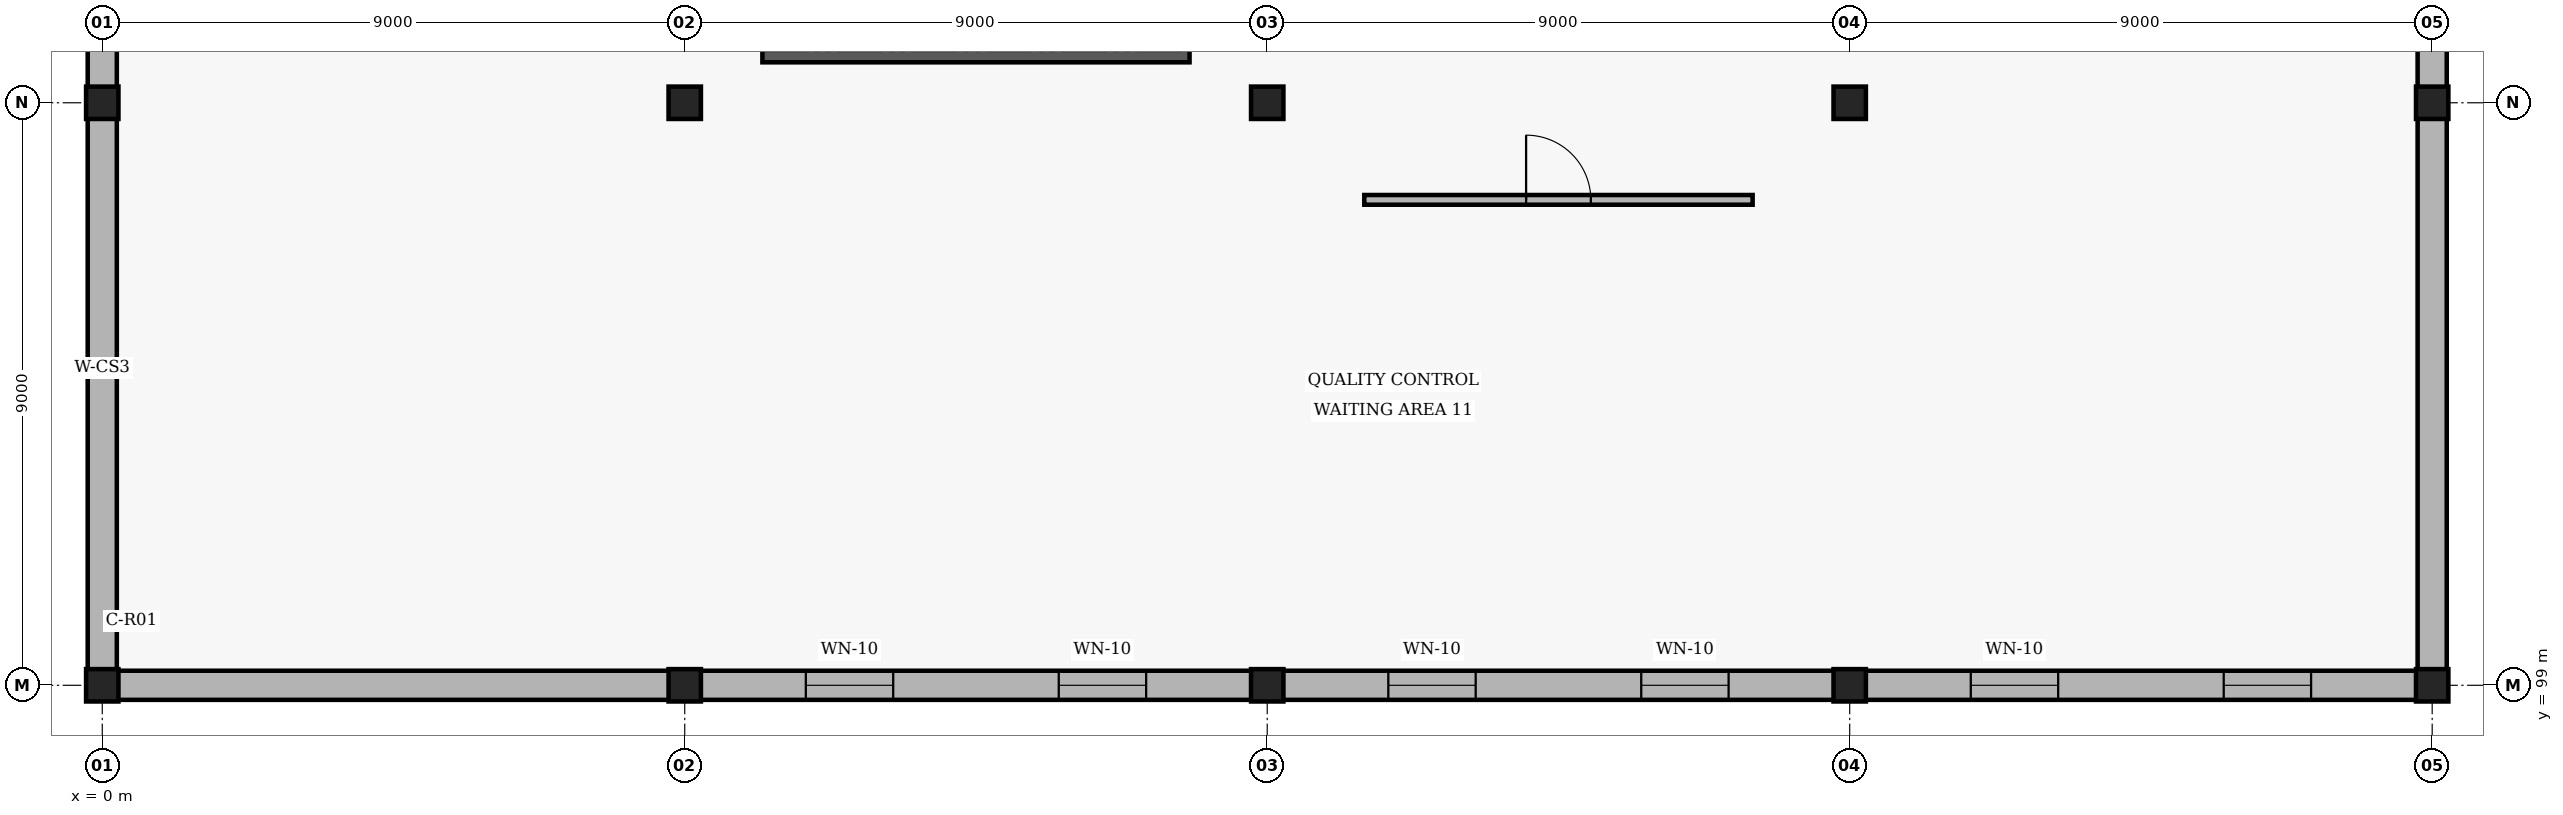
"""IFC4 building model, lengths in metres.
Left out: names, types, materials, properties, quantities, classifications, styles, units other than length and angle.
Written with IfcOpenShell. Run it as: python <this file> out.ifc"""

import sys

from ifc_helpers import new_model, si_unit, direction, frame, frame_2d, origin, origin_2d, place, context, subcontext, project, spatial, rectangle, extrude, element, fill, save


model = new_model("IFC4")
c1 = context("Model", 3, precision=1e-05, world=origin(), true_north=direction((0.0, 1.0)))
c2 = subcontext(c1, "Body", "Model", "MODEL_VIEW")
j1 = project(units=[si_unit("LENGTHUNIT", "METRE"), si_unit("PLANEANGLEUNIT", "RADIAN")], contexts=[c1])
p1 = place(None, origin())
s1 = spatial("IfcSite", under=j1, at=p1, CompositionType="ELEMENT")
p2 = place(p1, origin())
s2 = spatial("IfcBuilding", under=s1, at=p2, CompositionType="ELEMENT")
p3 = place(p2, frame((0.0, 0.0, 9.6)))
s3 = spatial("IfcBuildingStorey", under=s2, at=p3, CompositionType="ELEMENT", Elevation=9.6)
for number, where, z_axis, x_axis in (
    (1, (0.0, 99.0, 0.0), (0.0, 0.0, 1.0), (1.0, 0.0, 0.0)),
    (2, (0.0, 108.0, 0.0), (0.0, 0.0, 1.0), (1.0, 0.0, 0.0)),
    (3, (9.0, 99.0, 0.0), (0.0, 0.0, 1.0), (1.0, 0.0, 0.0)),
    (4, (9.0, 108.0, 0.0), (0.0, 0.0, 1.0), (1.0, 0.0, 0.0)),
    (5, (18.0, 99.0, 0.0), (0.0, 0.0, 1.0), (1.0, 0.0, 0.0)),
    (6, (18.0, 108.0, 0.0), (0.0, 0.0, 1.0), (1.0, 0.0, 0.0)),
    (7, (27.0, 99.0, 0.0), (0.0, 0.0, 1.0), (1.0, 0.0, 0.0)),
    (8, (27.0, 108.0, 0.0), (0.0, 0.0, 1.0), (1.0, 0.0, 0.0)),
    (9, (36.0, 99.0, 0.0), (0.0, 0.0, 1.0), (1.0, 0.0, 0.0)),
    (10, (36.0, 108.0, 0.0), (0.0, 0.0, 1.0), (1.0, 0.0, 0.0)),
):
    element("IfcColumn", number, at=place(p3, frame(where, z_axis=z_axis, x_axis=x_axis)), inside=s3, PredefinedType="COLUMN", context=c2, shape_type="SweptSolid", body=[
        extrude(rectangle(XDim=0.5, YDim=0.5, at=origin_2d()), origin(), (0.0, 0.0, 1.0), 3.9),
    ])
p4 = place(p3, frame((0.0, 99.06, 0.0), z_axis=(0.0, 0.0, 1.0), x_axis=(0.0, 1.0, 0.0)))
e11 = element("IfcWall", 11, at=p4, inside=s3, PredefinedType="SOLIDWALL", context=c2, shape_type="SweptSolid", body=[
    extrude(rectangle(XDim=8.88, YDim=0.45, at=frame_2d((4.44, 0.0))), origin(), (0.0, 0.0, 1.0), 3.15),
])
p5 = place(p3, frame((0.0, 108.06, 0.0), z_axis=(0.0, 0.0, 1.0), x_axis=(0.0, 1.0, 0.0)))
e12 = element("IfcWall", 12, at=p5, inside=s3, PredefinedType="SOLIDWALL", context=c2, shape_type="SweptSolid", body=[
    extrude(rectangle(XDim=8.88, YDim=0.45, at=frame_2d((4.44, 0.0))), origin(), (0.0, 0.0, 1.0), 3.15),
])
p6 = place(p5, frame((1.936, 0.0, 0.9)))
e13 = element("IfcOpeningElement", 13, at=p6, cuts=e12, PredefinedType="OPENING", context=c2, shape_type="SweptSolid", body=[
    extrude(rectangle(XDim=1.1, YDim=1.65, at=frame_2d((0.55, 0.825))), frame((0.0, 0.235, 0.0), z_axis=(0.0, -1.0, 0.0), x_axis=(1.0, 0.0, 0.0)), (0.0, 0.0, 1.0), 0.47),
])
p7 = place(p5, frame((5.844, 0.0, 0.9)))
e14 = element("IfcOpeningElement", 14, at=p7, cuts=e12, PredefinedType="OPENING", context=c2, shape_type="SweptSolid", body=[
    extrude(rectangle(XDim=1.1, YDim=1.65, at=frame_2d((0.55, 0.825))), frame((0.0, 0.235, 0.0), z_axis=(0.0, -1.0, 0.0), x_axis=(1.0, 0.0, 0.0)), (0.0, 0.0, 1.0), 0.47),
])
p8 = place(p3, frame((0.06, 99.0, 0.0), z_axis=(0.0, 0.0, 1.0), x_axis=(1.0, 0.0, 0.0)))
e15 = element("IfcWall", 15, at=p8, inside=s3, PredefinedType="SOLIDWALL", context=c2, shape_type="SweptSolid", body=[
    extrude(rectangle(XDim=8.88, YDim=0.45, at=frame_2d((4.44, 0.0))), origin(), (0.0, 0.0, 1.0), 3.15),
])
p9 = place(p3, frame((9.06, 99.0, 0.0), z_axis=(0.0, 0.0, 1.0), x_axis=(1.0, 0.0, 0.0)))
e16 = element("IfcWall", 16, at=p9, inside=s3, PredefinedType="SOLIDWALL", context=c2, shape_type="SweptSolid", body=[
    extrude(rectangle(XDim=8.88, YDim=0.45, at=frame_2d((4.44, 0.0))), origin(), (0.0, 0.0, 1.0), 3.15),
])
p10 = place(p9, frame((1.811, 0.0, 0.9)))
e17 = element("IfcOpeningElement", 17, at=p10, cuts=e16, PredefinedType="OPENING", context=c2, shape_type="SweptSolid", body=[
    extrude(rectangle(XDim=1.35, YDim=1.5, at=frame_2d((0.675, 0.75))), frame((0.0, 0.235, 0.0), z_axis=(0.0, -1.0, 0.0), x_axis=(1.0, 0.0, 0.0)), (0.0, 0.0, 1.0), 0.47),
])
p11 = place(p9, frame((5.719, 0.0, 0.9)))
e18 = element("IfcOpeningElement", 18, at=p11, cuts=e16, PredefinedType="OPENING", context=c2, shape_type="SweptSolid", body=[
    extrude(rectangle(XDim=1.35, YDim=1.5, at=frame_2d((0.675, 0.75))), frame((0.0, 0.235, 0.0), z_axis=(0.0, -1.0, 0.0), x_axis=(1.0, 0.0, 0.0)), (0.0, 0.0, 1.0), 0.47),
])
p12 = place(p3, frame((18.06, 99.0, 0.0), z_axis=(0.0, 0.0, 1.0), x_axis=(1.0, 0.0, 0.0)))
e19 = element("IfcWall", 19, at=p12, inside=s3, PredefinedType="SOLIDWALL", context=c2, shape_type="SweptSolid", body=[
    extrude(rectangle(XDim=8.88, YDim=0.45, at=frame_2d((4.44, 0.0))), origin(), (0.0, 0.0, 1.0), 3.15),
])
p13 = place(p12, frame((1.811, 0.0, 0.9)))
e20 = element("IfcOpeningElement", 20, at=p13, cuts=e19, PredefinedType="OPENING", context=c2, shape_type="SweptSolid", body=[
    extrude(rectangle(XDim=1.35, YDim=1.5, at=frame_2d((0.675, 0.75))), frame((0.0, 0.235, 0.0), z_axis=(0.0, -1.0, 0.0), x_axis=(1.0, 0.0, 0.0)), (0.0, 0.0, 1.0), 0.47),
])
p14 = place(p12, frame((5.719, 0.0, 0.9)))
e21 = element("IfcOpeningElement", 21, at=p14, cuts=e19, PredefinedType="OPENING", context=c2, shape_type="SweptSolid", body=[
    extrude(rectangle(XDim=1.35, YDim=1.5, at=frame_2d((0.675, 0.75))), frame((0.0, 0.235, 0.0), z_axis=(0.0, -1.0, 0.0), x_axis=(1.0, 0.0, 0.0)), (0.0, 0.0, 1.0), 0.47),
])
p15 = place(p3, frame((27.06, 99.0, 0.0), z_axis=(0.0, 0.0, 1.0), x_axis=(1.0, 0.0, 0.0)))
e22 = element("IfcWall", 22, at=p15, inside=s3, PredefinedType="SOLIDWALL", context=c2, shape_type="SweptSolid", body=[
    extrude(rectangle(XDim=8.88, YDim=0.45, at=frame_2d((4.44, 0.0))), origin(), (0.0, 0.0, 1.0), 3.15),
])
p16 = place(p15, frame((1.811, 0.0, 0.9)))
e23 = element("IfcOpeningElement", 23, at=p16, cuts=e22, PredefinedType="OPENING", context=c2, shape_type="SweptSolid", body=[
    extrude(rectangle(XDim=1.35, YDim=1.5, at=frame_2d((0.675, 0.75))), frame((0.0, 0.235, 0.0), z_axis=(0.0, -1.0, 0.0), x_axis=(1.0, 0.0, 0.0)), (0.0, 0.0, 1.0), 0.47),
])
p17 = place(p15, frame((5.719, 0.0, 0.9)))
e24 = element("IfcOpeningElement", 24, at=p17, cuts=e22, PredefinedType="OPENING", context=c2, shape_type="SweptSolid", body=[
    extrude(rectangle(XDim=1.35, YDim=1.5, at=frame_2d((0.675, 0.75))), frame((0.0, 0.235, 0.0), z_axis=(0.0, -1.0, 0.0), x_axis=(1.0, 0.0, 0.0)), (0.0, 0.0, 1.0), 0.47),
])
p18 = place(p3, frame((36.0, 99.06, 0.0), z_axis=(0.0, 0.0, 1.0), x_axis=(0.0, 1.0, 0.0)))
e25 = element("IfcWall", 25, at=p18, inside=s3, PredefinedType="SOLIDWALL", context=c2, shape_type="SweptSolid", body=[
    extrude(rectangle(XDim=8.88, YDim=0.45, at=frame_2d((4.44, 0.0))), origin(), (0.0, 0.0, 1.0), 3.15),
])
p19 = place(p3, frame((36.0, 108.06, 0.0), z_axis=(0.0, 0.0, 1.0), x_axis=(0.0, 1.0, 0.0)))
e26 = element("IfcWall", 26, at=p19, inside=s3, PredefinedType="SOLIDWALL", context=c2, shape_type="SweptSolid", body=[
    extrude(rectangle(XDim=8.88, YDim=0.45, at=frame_2d((4.44, 0.0))), origin(), (0.0, 0.0, 1.0), 3.15),
])
p20 = place(p19, frame((1.661, 0.0, 0.9)))
e27 = element("IfcOpeningElement", 27, at=p20, cuts=e26, PredefinedType="OPENING", context=c2, shape_type="SweptSolid", body=[
    extrude(rectangle(XDim=1.65, YDim=1.5, at=frame_2d((0.825, 0.75))), frame((0.0, 0.235, 0.0), z_axis=(0.0, -1.0, 0.0), x_axis=(1.0, 0.0, 0.0)), (0.0, 0.0, 1.0), 0.47),
])
p21 = place(p19, frame((5.569, 0.0, 0.9)))
e28 = element("IfcOpeningElement", 28, at=p21, cuts=e26, PredefinedType="OPENING", context=c2, shape_type="SweptSolid", body=[
    extrude(rectangle(XDim=1.65, YDim=1.5, at=frame_2d((0.825, 0.75))), frame((0.0, 0.235, 0.0), z_axis=(0.0, -1.0, 0.0), x_axis=(1.0, 0.0, 0.0)), (0.0, 0.0, 1.0), 0.47),
])
p22 = place(p3, frame((10.2, 108.8, 0.0), z_axis=(0.0, 0.0, 1.0), x_axis=(1.0, 0.0, 0.0)))
e29 = element("IfcWall", 29, at=p22, inside=s3, PredefinedType="SHEAR", context=c2, shape_type="SweptSolid", body=[
    extrude(rectangle(XDim=6.6, YDim=0.35, at=frame_2d((3.3, 0.0))), origin(), (0.0, 0.0, 1.0), 3.7),
])
p23 = place(p3, frame((19.5, 106.5, 0.0), z_axis=(0.0, 0.0, 1.0), x_axis=(1.0, 0.0, 0.0)))
e30 = element("IfcWall", 30, at=p23, inside=s3, PredefinedType="PARTITIONING", context=c2, shape_type="SweptSolid", body=[
    extrude(rectangle(XDim=6.0, YDim=0.15, at=frame_2d((3.0, 0.0))), origin(), (0.0, 0.0, 1.0), 2.9),
])
p24 = place(p23, frame((2.5, 0.0, 0.0)))
e31 = element("IfcOpeningElement", 31, at=p24, cuts=e30, PredefinedType="OPENING", context=c2, shape_type="SweptSolid", body=[
    extrude(rectangle(XDim=1.0, YDim=2.1, at=frame_2d((0.5, 1.05))), frame((0.0, 0.085, 0.0), z_axis=(0.0, -1.0, 0.0), x_axis=(1.0, 0.0, 0.0)), (0.0, 0.0, 1.0), 0.17),
])
p25 = place(p10, origin())
e32 = element("IfcWindow", 32, at=p25, inside=s3, PartitioningType="SINGLE_PANEL", PredefinedType="WINDOW", context=c2, shape_type="SweptSolid", body=[
    extrude(rectangle(XDim=1.35, YDim=1.5, at=frame_2d((0.675, 0.75))), frame((0.0, 0.03, 0.0), z_axis=(0.0, -1.0, 0.0), x_axis=(1.0, 0.0, 0.0)), (0.0, 0.0, 1.0), 0.06),
])
fill(e17, e32)
p26 = place(p11, origin())
e33 = element("IfcWindow", 33, at=p26, inside=s3, PartitioningType="SINGLE_PANEL", PredefinedType="WINDOW", context=c2, shape_type="SweptSolid", body=[
    extrude(rectangle(XDim=1.35, YDim=1.5, at=frame_2d((0.675, 0.75))), frame((0.0, 0.03, 0.0), z_axis=(0.0, -1.0, 0.0), x_axis=(1.0, 0.0, 0.0)), (0.0, 0.0, 1.0), 0.06),
])
fill(e18, e33)
p27 = place(p13, origin())
e34 = element("IfcWindow", 34, at=p27, inside=s3, PartitioningType="SINGLE_PANEL", PredefinedType="WINDOW", context=c2, shape_type="SweptSolid", body=[
    extrude(rectangle(XDim=1.35, YDim=1.5, at=frame_2d((0.675, 0.75))), frame((0.0, 0.03, 0.0), z_axis=(0.0, -1.0, 0.0), x_axis=(1.0, 0.0, 0.0)), (0.0, 0.0, 1.0), 0.06),
])
fill(e20, e34)
p28 = place(p14, origin())
e35 = element("IfcWindow", 35, at=p28, inside=s3, PartitioningType="SINGLE_PANEL", PredefinedType="WINDOW", context=c2, shape_type="SweptSolid", body=[
    extrude(rectangle(XDim=1.35, YDim=1.5, at=frame_2d((0.675, 0.75))), frame((0.0, 0.03, 0.0), z_axis=(0.0, -1.0, 0.0), x_axis=(1.0, 0.0, 0.0)), (0.0, 0.0, 1.0), 0.06),
])
fill(e21, e35)
p29 = place(p16, origin())
e36 = element("IfcWindow", 36, at=p29, inside=s3, PartitioningType="SINGLE_PANEL", PredefinedType="WINDOW", context=c2, shape_type="SweptSolid", body=[
    extrude(rectangle(XDim=1.35, YDim=1.5, at=frame_2d((0.675, 0.75))), frame((0.0, 0.03, 0.0), z_axis=(0.0, -1.0, 0.0), x_axis=(1.0, 0.0, 0.0)), (0.0, 0.0, 1.0), 0.06),
])
fill(e23, e36)
p30 = place(p17, origin())
e37 = element("IfcWindow", 37, at=p30, inside=s3, PartitioningType="SINGLE_PANEL", PredefinedType="WINDOW", context=c2, shape_type="SweptSolid", body=[
    extrude(rectangle(XDim=1.35, YDim=1.5, at=frame_2d((0.675, 0.75))), frame((0.0, 0.03, 0.0), z_axis=(0.0, -1.0, 0.0), x_axis=(1.0, 0.0, 0.0)), (0.0, 0.0, 1.0), 0.06),
])
fill(e24, e37)
p31 = place(p24, origin())
e38 = element("IfcDoor", 38, at=p31, inside=s3, OperationType="SINGLE_SWING_LEFT", PredefinedType="DOOR", context=c2, shape_type="SweptSolid", body=[
    extrude(rectangle(XDim=1.0, YDim=2.1, at=frame_2d((0.5, 1.05))), frame((0.0, 0.025, 0.0), z_axis=(0.0, -1.0, 0.0), x_axis=(1.0, 0.0, 0.0)), (0.0, 0.0, 1.0), 0.05),
])
fill(e31, e38)
save(model, sys.argv[1])
